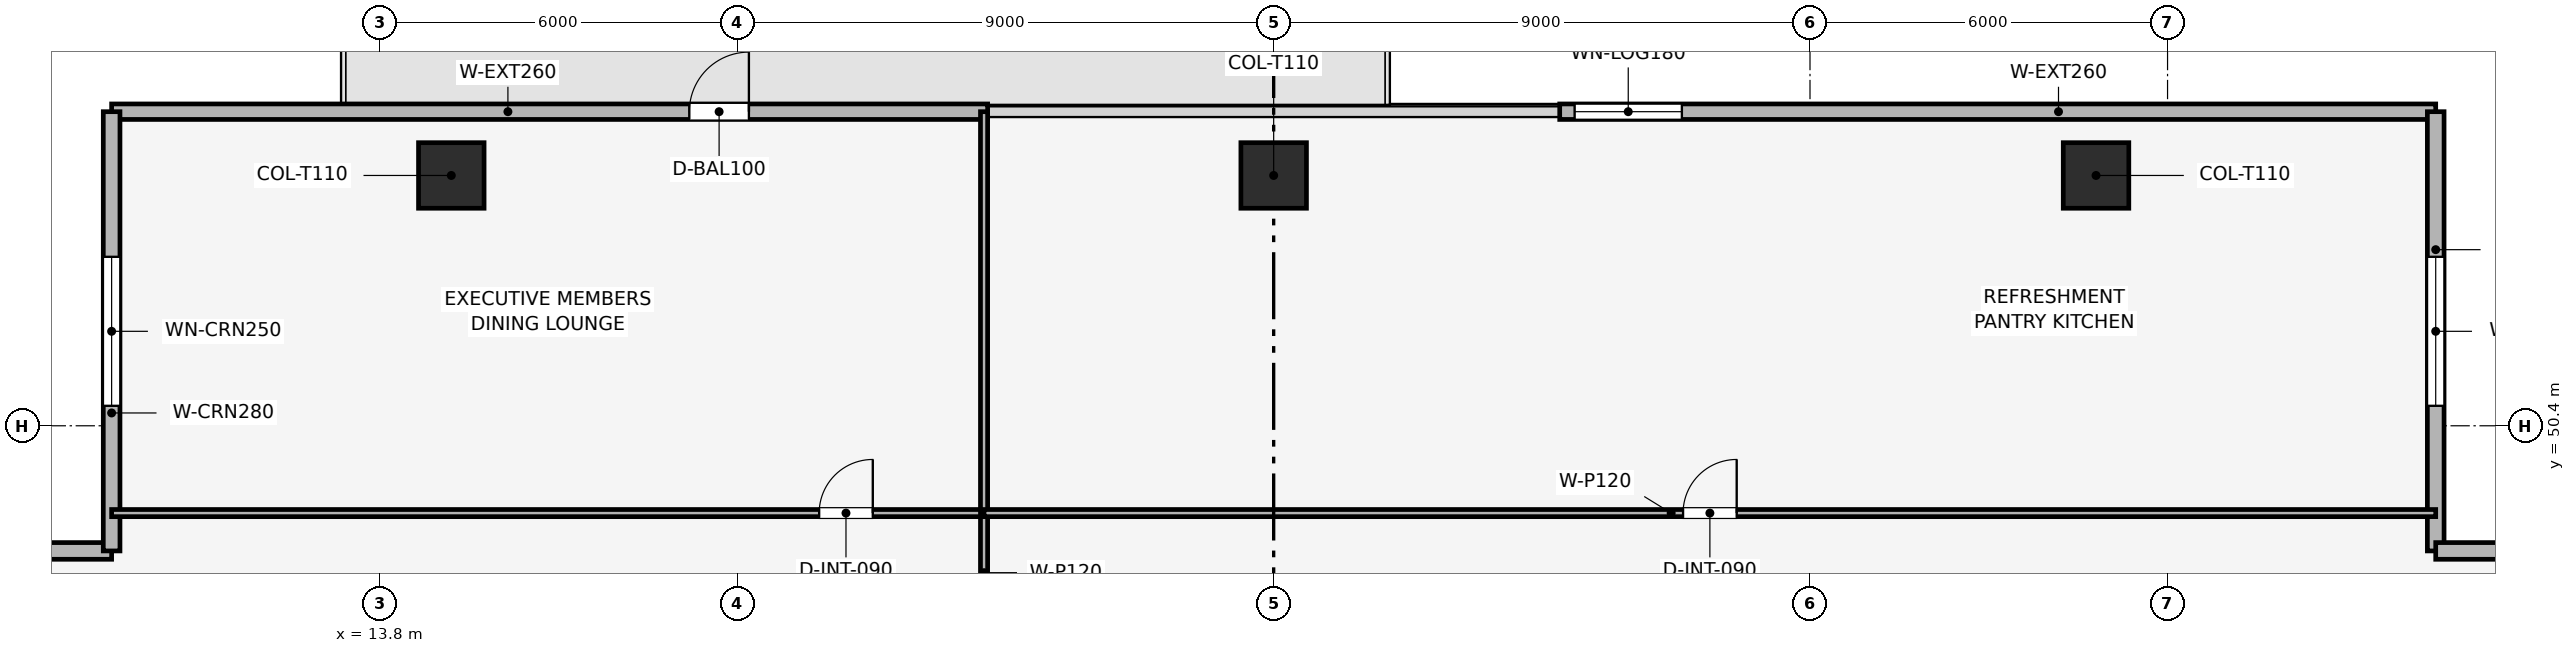
"""IFC4 building model, lengths in metres.
Left out: names, types, materials, properties, quantities, classifications, styles, units other than length and angle.
Written with IfcOpenShell. Run it as: python <this file> out.ifc"""

import sys

from ifc_helpers import new_model, si_unit, direction, frame, frame_2d, origin, origin_2d, place, context, subcontext, project, spatial, rectangle, extrude, element, fill, save


model = new_model("IFC4")
c1 = context("Model", 3, precision=1e-05, world=origin(), true_north=direction((0.0, 1.0)))
c2 = subcontext(c1, "Body", "Model", "MODEL_VIEW")
j1 = project(units=[si_unit("LENGTHUNIT", "METRE"), si_unit("PLANEANGLEUNIT", "RADIAN")], contexts=[c1])
p1 = place(None, origin())
s1 = spatial("IfcSite", under=j1, at=p1, CompositionType="ELEMENT")
p2 = place(p1, origin())
s2 = spatial("IfcBuilding", under=s1, at=p2, CompositionType="ELEMENT")
p3 = place(p2, frame((0.0, 0.0, 237.45)))
s3 = spatial("IfcBuildingStorey", under=s2, at=p3, CompositionType="ELEMENT", Elevation=237.45)
for number, where, z_axis, x_axis in (
    (1, (42.6, 54.6, 0.003), (0.0, 0.0, 1.0), (1.0, 0.0, 0.0)),
    (2, (28.8, 54.6, 0.003), (0.0, 0.0, 1.0), (1.0, 0.0, 0.0)),
    (3, (15.0, 54.6, 0.003), (0.0, 0.0, 1.0), (1.0, 0.0, 0.0)),
):
    element("IfcColumn", number, at=place(p3, frame(where, z_axis=z_axis, x_axis=x_axis)), inside=s3, PredefinedType="COLUMN", context=c2, shape_type="SweptSolid", body=[
        extrude(rectangle(XDim=1.1, YDim=1.1, at=origin_2d()), origin(), (0.0, 0.0, 1.0), 3.494),
    ])
p4 = place(p3, frame((9.3, 55.67, 0.0), z_axis=(0.0, 0.0, 1.0), x_axis=(1.0, 0.0, 0.0)))
e4 = element("IfcWall", 4, at=p4, inside=s3, PredefinedType="SOLIDWALL", context=c2, shape_type="SweptSolid", body=[
    extrude(rectangle(XDim=14.7, YDim=0.26, at=frame_2d((7.35, 0.0))), origin(), (0.0, 0.0, 1.0), 3.5),
])
p5 = place(p4, frame((9.694, 0.0, 0.0)))
e5 = element("IfcOpeningElement", 5, at=p5, cuts=e4, PredefinedType="OPENING", context=c2, shape_type="SweptSolid", body=[
    extrude(rectangle(XDim=1.0, YDim=2.2, at=frame_2d((0.5, 1.1))), frame((0.0, 0.14, 0.0), z_axis=(0.0, -1.0, 0.0), x_axis=(1.0, 0.0, 0.0)), (0.0, 0.0, 1.0), 0.28),
])
p6 = place(p3, frame((33.6, 55.67, 0.0), z_axis=(0.0, 0.0, 1.0), x_axis=(1.0, 0.0, 0.0)))
e6 = element("IfcWall", 6, at=p6, inside=s3, PredefinedType="SOLIDWALL", context=c2, shape_type="SweptSolid", body=[
    extrude(rectangle(XDim=14.7, YDim=0.26, at=frame_2d((7.35, 0.0))), origin(), (0.0, 0.0, 1.0), 3.5),
])
p7 = place(p6, frame((0.25, 0.0, 0.72)))
e7 = element("IfcOpeningElement", 7, at=p7, cuts=e6, PredefinedType="OPENING", context=c2, shape_type="SweptSolid", body=[
    extrude(rectangle(XDim=1.8, YDim=2.1, at=frame_2d((0.9, 1.05))), frame((0.0, 0.14, 0.0), z_axis=(0.0, -1.0, 0.0), x_axis=(1.0, 0.0, 0.0)), (0.0, 0.0, 1.0), 0.28),
])
p8 = place(p3, frame((1.93, 48.3, 0.0), z_axis=(0.0, 0.0, 1.0), x_axis=(1.0, 0.0, 0.0)))
e8 = element("IfcWall", 8, at=p8, inside=s3, PredefinedType="SOLIDWALL", context=c2, shape_type="SweptSolid", body=[
    extrude(rectangle(XDim=7.37, YDim=0.28, at=frame_2d((3.685, 0.0))), origin(), (0.0, 0.0, 1.0), 3.5),
])
p9 = place(p8, frame((2.435, 0.0, 0.72)))
e9 = element("IfcOpeningElement", 9, at=p9, cuts=e8, PredefinedType="OPENING", context=c2, shape_type="SweptSolid", body=[
    extrude(rectangle(XDim=2.5, YDim=1.9, at=frame_2d((1.25, 0.95))), frame((0.0, 0.15, 0.0), z_axis=(0.0, -1.0, 0.0), x_axis=(1.0, 0.0, 0.0)), (0.0, 0.0, 1.0), 0.3),
])
p10 = place(p3, frame((9.3, 48.3, 0.0), z_axis=(0.0, 0.0, 1.0), x_axis=(0.0, 1.0, 0.0)))
e10 = element("IfcWall", 10, at=p10, inside=s3, PredefinedType="SOLIDWALL", context=c2, shape_type="SweptSolid", body=[
    extrude(rectangle(XDim=7.37, YDim=0.28, at=frame_2d((3.685, 0.0))), origin(), (0.0, 0.0, 1.0), 3.5),
])
p11 = place(p10, frame((2.435, 0.0, 0.72)))
e11 = element("IfcOpeningElement", 11, at=p11, cuts=e10, PredefinedType="OPENING", context=c2, shape_type="SweptSolid", body=[
    extrude(rectangle(XDim=2.5, YDim=1.9, at=frame_2d((1.25, 0.95))), frame((0.0, 0.15, 0.0), z_axis=(0.0, -1.0, 0.0), x_axis=(1.0, 0.0, 0.0)), (0.0, 0.0, 1.0), 0.3),
])
p12 = place(p3, frame((48.3, 55.67, 0.0), z_axis=(0.0, 0.0, 1.0), x_axis=(0.0, -1.0, 0.0)))
e12 = element("IfcWall", 12, at=p12, inside=s3, PredefinedType="SOLIDWALL", context=c2, shape_type="SweptSolid", body=[
    extrude(rectangle(XDim=7.37, YDim=0.28, at=frame_2d((3.685, 0.0))), origin(), (0.0, 0.0, 1.0), 3.5),
])
p13 = place(p12, frame((2.435, 0.0, 0.72)))
e13 = element("IfcOpeningElement", 13, at=p13, cuts=e12, PredefinedType="OPENING", context=c2, shape_type="SweptSolid", body=[
    extrude(rectangle(XDim=2.5, YDim=1.9, at=frame_2d((1.25, 0.95))), frame((0.0, 0.15, 0.0), z_axis=(0.0, -1.0, 0.0), x_axis=(1.0, 0.0, 0.0)), (0.0, 0.0, 1.0), 0.3),
])
p14 = place(p3, frame((48.3, 48.3, 0.0), z_axis=(0.0, 0.0, 1.0), x_axis=(1.0, 0.0, 0.0)))
e14 = element("IfcWall", 14, at=p14, inside=s3, PredefinedType="SOLIDWALL", context=c2, shape_type="SweptSolid", body=[
    extrude(rectangle(XDim=7.37, YDim=0.28, at=frame_2d((3.685, 0.0))), origin(), (0.0, 0.0, 1.0), 3.5),
])
p15 = place(p14, frame((2.435, 0.0, 0.72)))
e15 = element("IfcOpeningElement", 15, at=p15, cuts=e14, PredefinedType="OPENING", context=c2, shape_type="SweptSolid", body=[
    extrude(rectangle(XDim=2.5, YDim=1.9, at=frame_2d((1.25, 0.95))), frame((0.0, 0.15, 0.0), z_axis=(0.0, -1.0, 0.0), x_axis=(1.0, 0.0, 0.0)), (0.0, 0.0, 1.0), 0.3),
])
p16 = place(p3, frame((9.3, 48.935, 0.0), z_axis=(0.0, 0.0, 1.0), x_axis=(1.0, 0.0, 0.0)))
e16 = element("IfcWall", 16, at=p16, inside=s3, PredefinedType="PARTITIONING", context=c2, shape_type="SweptSolid", body=[
    extrude(rectangle(XDim=14.64, YDim=0.12, at=frame_2d((7.32, 0.0))), origin(), (0.0, 0.0, 1.0), 2.685),
])
p17 = place(p16, frame((11.873, 0.0, 0.0)))
e17 = element("IfcOpeningElement", 17, at=p17, cuts=e16, PredefinedType="OPENING", context=c2, shape_type="SweptSolid", body=[
    extrude(rectangle(XDim=0.9, YDim=2.1, at=frame_2d((0.45, 1.05))), frame((0.0, 0.07, 0.0), z_axis=(0.0, -1.0, 0.0), x_axis=(1.0, 0.0, 0.0)), (0.0, 0.0, 1.0), 0.14),
])
p18 = place(p3, frame((23.94, 40.2, 0.0), z_axis=(0.0, 0.0, 1.0), x_axis=(0.0, 1.0, 0.0)))
e18 = element("IfcWall", 18, at=p18, inside=s3, PredefinedType="PARTITIONING", context=c2, shape_type="SweptSolid", body=[
    extrude(rectangle(XDim=15.47, YDim=0.12, at=frame_2d((7.735, 0.0))), origin(), (0.0, 0.0, 1.0), 2.685),
])
p19 = place(p3, frame((23.94, 48.935, 0.0), z_axis=(0.0, 0.0, 1.0), x_axis=(1.0, 0.0, 0.0)))
e19 = element("IfcWall", 19, at=p19, inside=s3, PredefinedType="PARTITIONING", context=c2, shape_type="SweptSolid", body=[
    extrude(rectangle(XDim=24.36, YDim=0.12, at=frame_2d((12.18, 0.0))), origin(), (0.0, 0.0, 1.0), 2.685),
])
p20 = place(p19, frame((11.73, 0.0, 0.0)))
e20 = element("IfcOpeningElement", 20, at=p20, cuts=e19, PredefinedType="OPENING", context=c2, shape_type="SweptSolid", body=[
    extrude(rectangle(XDim=0.9, YDim=2.1, at=frame_2d((0.45, 1.05))), frame((0.0, 0.07, 0.0), z_axis=(0.0, -1.0, 0.0), x_axis=(1.0, 0.0, 0.0)), (0.0, 0.0, 1.0), 0.14),
])
p21 = place(p5, origin())
e21 = element("IfcDoor", 21, at=p21, inside=s3, OperationType="SINGLE_SWING_RIGHT", PredefinedType="DOOR", context=c2, shape_type="SweptSolid", body=[
    extrude(rectangle(XDim=1.0, YDim=2.2, at=frame_2d((0.5, 1.1))), frame((0.0, 0.025, 0.0), z_axis=(0.0, -1.0, 0.0), x_axis=(1.0, 0.0, 0.0)), (0.0, 0.0, 1.0), 0.05),
])
fill(e5, e21)
p22 = place(p7, origin())
e22 = element("IfcWindow", 22, at=p22, inside=s3, PartitioningType="SINGLE_PANEL", PredefinedType="WINDOW", context=c2, shape_type="SweptSolid", body=[
    extrude(rectangle(XDim=1.8, YDim=2.1, at=frame_2d((0.9, 1.05))), frame((0.0, 0.03, 0.0), z_axis=(0.0, -1.0, 0.0), x_axis=(1.0, 0.0, 0.0)), (0.0, 0.0, 1.0), 0.06),
])
fill(e7, e22)
p23 = place(p11, origin())
e23 = element("IfcWindow", 23, at=p23, inside=s3, PartitioningType="SINGLE_PANEL", PredefinedType="WINDOW", context=c2, shape_type="SweptSolid", body=[
    extrude(rectangle(XDim=2.5, YDim=1.9, at=frame_2d((1.25, 0.95))), frame((0.0, 0.03, 0.0), z_axis=(0.0, -1.0, 0.0), x_axis=(1.0, 0.0, 0.0)), (0.0, 0.0, 1.0), 0.06),
])
fill(e11, e23)
p24 = place(p13, origin())
e24 = element("IfcWindow", 24, at=p24, inside=s3, PartitioningType="SINGLE_PANEL", PredefinedType="WINDOW", context=c2, shape_type="SweptSolid", body=[
    extrude(rectangle(XDim=2.5, YDim=1.9, at=frame_2d((1.25, 0.95))), frame((0.0, 0.03, 0.0), z_axis=(0.0, -1.0, 0.0), x_axis=(1.0, 0.0, 0.0)), (0.0, 0.0, 1.0), 0.06),
])
fill(e13, e24)
p25 = place(p17, origin())
e25 = element("IfcDoor", 25, at=p25, inside=s3, OperationType="SINGLE_SWING_RIGHT", PredefinedType="DOOR", context=c2, shape_type="SweptSolid", body=[
    extrude(rectangle(XDim=0.9, YDim=2.1, at=frame_2d((0.45, 1.05))), frame((0.0, 0.025, 0.0), z_axis=(0.0, -1.0, 0.0), x_axis=(1.0, 0.0, 0.0)), (0.0, 0.0, 1.0), 0.05),
])
fill(e17, e25)
p26 = place(p20, origin())
e26 = element("IfcDoor", 26, at=p26, inside=s3, OperationType="SINGLE_SWING_RIGHT", PredefinedType="DOOR", context=c2, shape_type="SweptSolid", body=[
    extrude(rectangle(XDim=0.9, YDim=2.1, at=frame_2d((0.45, 1.05))), frame((0.0, 0.025, 0.0), z_axis=(0.0, -1.0, 0.0), x_axis=(1.0, 0.0, 0.0)), (0.0, 0.0, 1.0), 0.05),
])
fill(e20, e26)
save(model, sys.argv[1])
